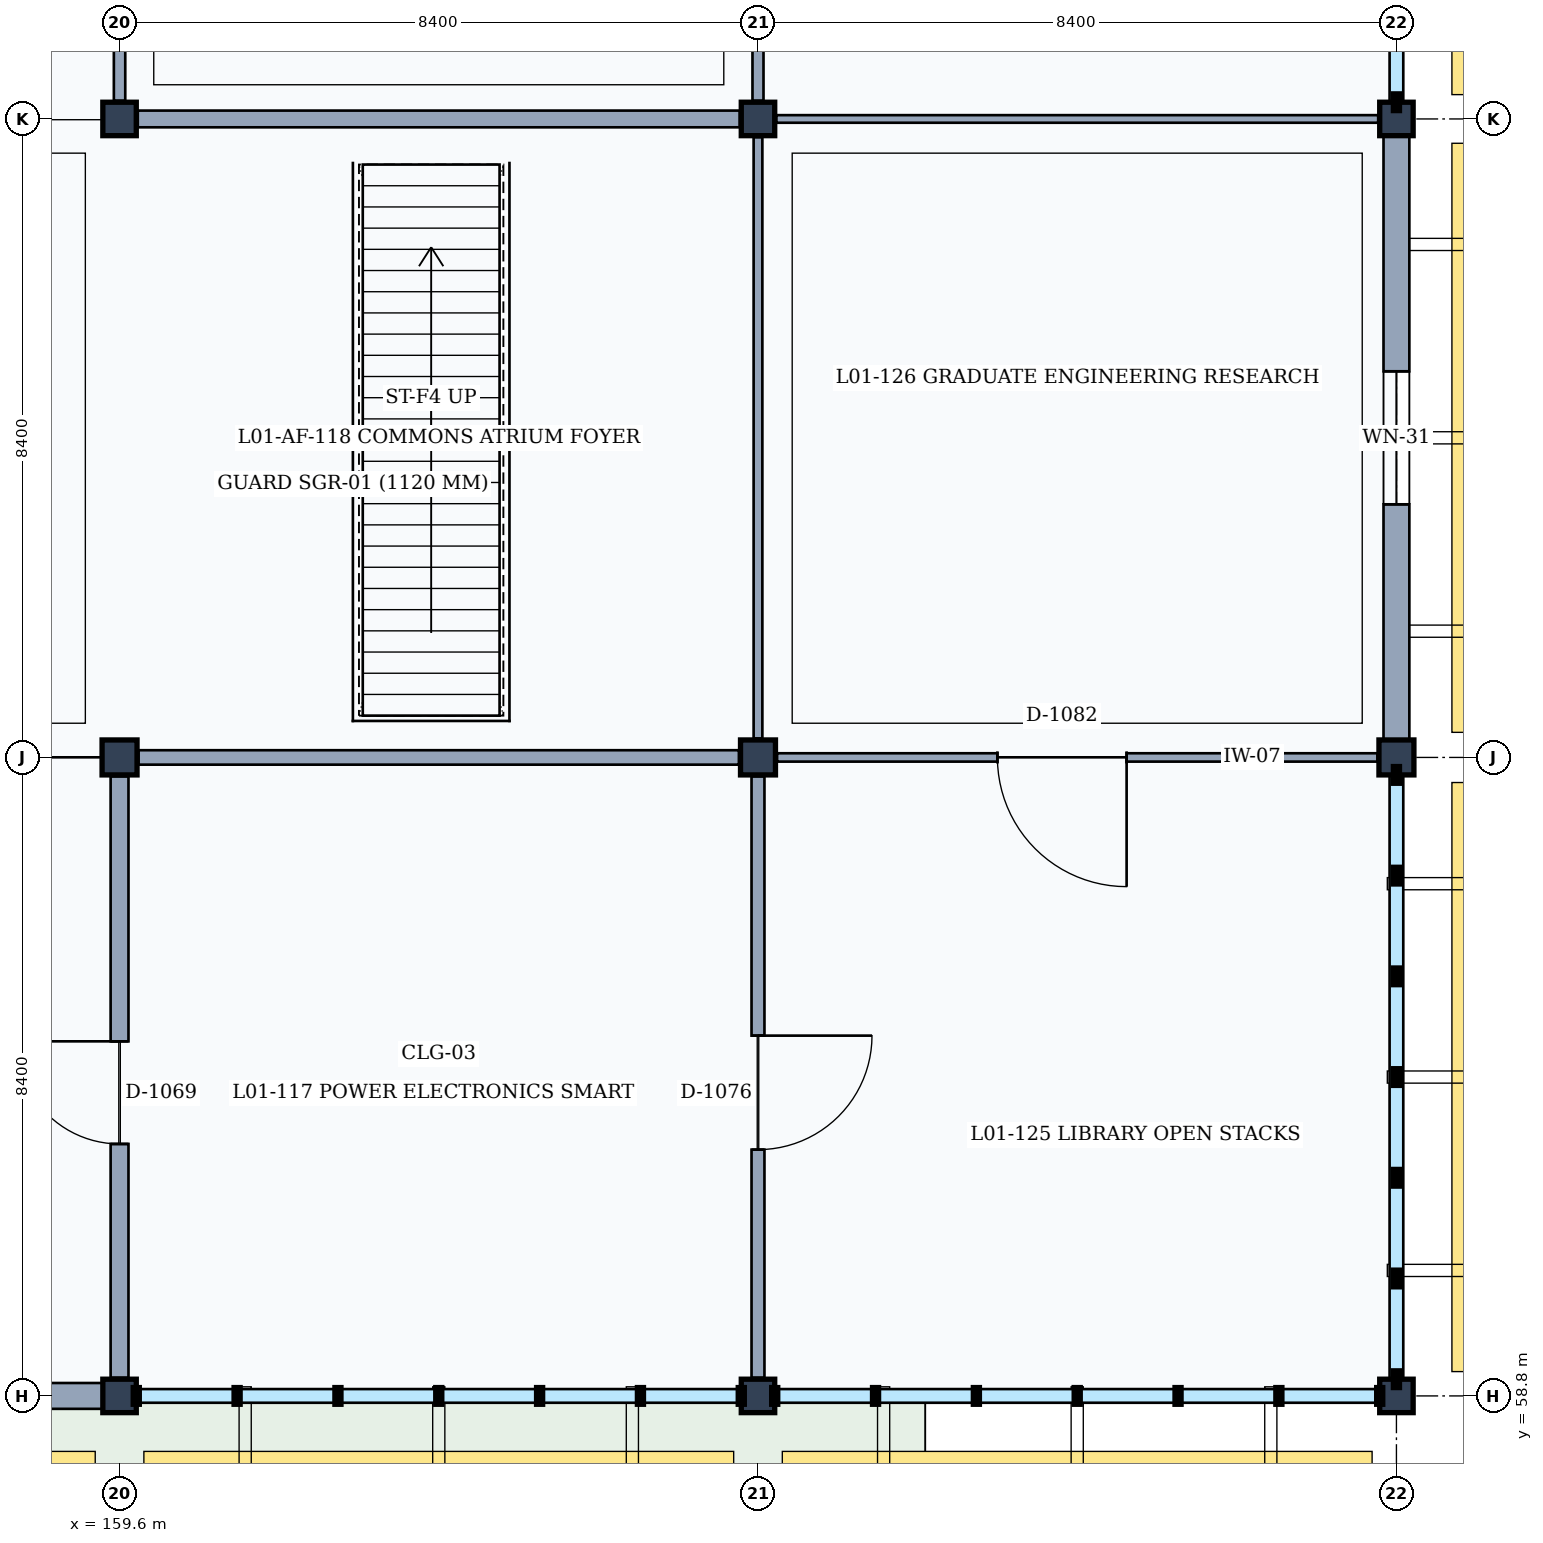
"""IFC4 building model, lengths in metres.
Left out: names, types, materials, properties, quantities, classifications, styles, units other than length and angle.
Written with IfcOpenShell. Run it as: python <this file> out.ifc"""

import sys

from ifc_helpers import new_model, si_unit, direction, frame, frame_2d, origin, origin_2d, place, context, subcontext, project, spatial, rectangle, extrude, element, fill, save


model = new_model("IFC4")
c1 = context("Model", 3, precision=1e-05, world=origin(), true_north=direction((0.0, 1.0)))
c2 = subcontext(c1, "Body", "Model", "MODEL_VIEW")
j1 = project(units=[si_unit("LENGTHUNIT", "METRE"), si_unit("PLANEANGLEUNIT", "RADIAN")], contexts=[c1])
p1 = place(None, origin())
s1 = spatial("IfcSite", under=j1, at=p1, CompositionType="ELEMENT")
p2 = place(p1, origin())
s2 = spatial("IfcBuilding", under=s1, at=p2, CompositionType="ELEMENT")
p3 = place(p2, frame((0.0, 0.0, 4.8)))
s3 = spatial("IfcBuildingStorey", under=s2, at=p3, CompositionType="ELEMENT", Elevation=4.8)
p4 = place(p3, frame((159.6, 58.8, 0.0), z_axis=(0.0, 0.0, 1.0), x_axis=(1.0, 0.0, 0.0)))
e1 = element("IfcColumn", 1, at=p4, inside=s3, PredefinedType="COLUMN", context=c2, shape_type="SweptSolid", body=[
    extrude(rectangle(XDim=0.44, YDim=0.44, at=origin_2d()), origin(), (0.0, 0.0, 1.0), 4.8),
])
p5 = place(p3, frame((159.6, 67.2, 0.0), z_axis=(0.0, 0.0, 1.0), x_axis=(1.0, 0.0, 0.0)))
e2 = element("IfcColumn", 2, at=p5, inside=s3, PredefinedType="COLUMN", context=c2, shape_type="SweptSolid", body=[
    extrude(rectangle(XDim=0.46, YDim=0.46, at=origin_2d()), origin(), (0.0, 0.0, 1.0), 4.8),
])
for number, where, z_axis, x_axis in (
    (3, (159.6, 75.6, 0.0), (0.0, 0.0, 1.0), (1.0, 0.0, 0.0)),
    (4, (168.0, 58.8, 0.0), (0.0, 0.0, 1.0), (1.0, 0.0, 0.0)),
):
    element("IfcColumn", number, at=place(p3, frame(where, z_axis=z_axis, x_axis=x_axis)), inside=s3, PredefinedType="COLUMN", context=c2, shape_type="SweptSolid", body=[
        extrude(rectangle(XDim=0.44, YDim=0.44, at=origin_2d()), origin(), (0.0, 0.0, 1.0), 4.8),
    ])
p6 = place(p3, frame((168.0, 67.2, 0.0), z_axis=(0.0, 0.0, 1.0), x_axis=(1.0, 0.0, 0.0)))
e5 = element("IfcColumn", 5, at=p6, inside=s3, PredefinedType="COLUMN", context=c2, shape_type="SweptSolid", body=[
    extrude(rectangle(XDim=0.46, YDim=0.46, at=origin_2d()), origin(), (0.0, 0.0, 1.0), 4.8),
])
for number, where, z_axis, x_axis in (
    (6, (168.0, 75.6, 0.0), (0.0, 0.0, 1.0), (1.0, 0.0, 0.0)),
    (7, (176.4, 58.8, 0.0), (0.0, 0.0, 1.0), (1.0, 0.0, 0.0)),
):
    element("IfcColumn", number, at=place(p3, frame(where, z_axis=z_axis, x_axis=x_axis)), inside=s3, PredefinedType="COLUMN", context=c2, shape_type="SweptSolid", body=[
        extrude(rectangle(XDim=0.44, YDim=0.44, at=origin_2d()), origin(), (0.0, 0.0, 1.0), 4.8),
    ])
p7 = place(p3, frame((176.4, 67.2, 0.0), z_axis=(0.0, 0.0, 1.0), x_axis=(1.0, 0.0, 0.0)))
e8 = element("IfcColumn", 8, at=p7, inside=s3, PredefinedType="COLUMN", context=c2, shape_type="SweptSolid", body=[
    extrude(rectangle(XDim=0.46, YDim=0.46, at=origin_2d()), origin(), (0.0, 0.0, 1.0), 4.8),
])
p8 = place(p3, frame((176.4, 75.6, 0.0), z_axis=(0.0, 0.0, 1.0), x_axis=(1.0, 0.0, 0.0)))
e9 = element("IfcColumn", 9, at=p8, inside=s3, PredefinedType="COLUMN", context=c2, shape_type="SweptSolid", body=[
    extrude(rectangle(XDim=0.44, YDim=0.44, at=origin_2d()), origin(), (0.0, 0.0, 1.0), 4.8),
])
p9 = place(p3, frame((159.38, 58.8, 0.0), z_axis=(0.0, 0.0, 1.0), x_axis=(-1.0, 0.0, 0.0)))
e10 = element("IfcWall", 10, at=p9, inside=s3, PredefinedType="SOLIDWALL", context=c2, shape_type="SweptSolid", body=[
    extrude(rectangle(XDim=7.96, YDim=0.34, at=frame_2d((3.98, 0.0))), origin(), (0.0, 0.0, 1.0), 3.96),
])
p10 = place(p9, frame((3.03, 0.0, 0.9)))
e11 = element("IfcOpeningElement", 11, at=p10, cuts=e10, PredefinedType="OPENING", context=c2, shape_type="SweptSolid", body=[
    extrude(rectangle(XDim=1.9, YDim=2.05, at=frame_2d((0.95, 1.025))), frame((0.0, 0.18, 0.0), z_axis=(0.0, -1.0, 0.0), x_axis=(1.0, 0.0, 0.0)), (0.0, 0.0, 1.0), 0.36),
])
p11 = place(p3, frame((176.4, 75.38, 0.0), z_axis=(0.0, 0.0, 1.0), x_axis=(0.0, -1.0, 0.0)))
e12 = element("IfcWall", 12, at=p11, inside=s3, PredefinedType="SOLIDWALL", context=c2, shape_type="SweptSolid", body=[
    extrude(rectangle(XDim=7.95, YDim=0.34, at=frame_2d((3.975, 0.0))), origin(), (0.0, 0.0, 1.0), 3.96),
])
p12 = place(p11, frame((3.1, 0.0, 0.9)))
e13 = element("IfcOpeningElement", 13, at=p12, cuts=e12, PredefinedType="OPENING", context=c2, shape_type="SweptSolid", body=[
    extrude(rectangle(XDim=1.75, YDim=1.85, at=frame_2d((0.875, 0.925))), frame((0.0, 0.18, 0.0), z_axis=(0.0, -1.0, 0.0), x_axis=(1.0, 0.0, 0.0)), (0.0, 0.0, 1.0), 0.36),
])
p13 = place(p3, frame((159.6, 59.04, 0.0), z_axis=(0.0, 0.0, 1.0), x_axis=(0.0, 1.0, 0.0)))
e14 = element("IfcWall", 14, at=p13, inside=s3, PredefinedType="PARTITIONING", context=c2, shape_type="SweptSolid", body=[
    extrude(rectangle(XDim=7.91, YDim=0.235, at=frame_2d((3.955, 0.0))), origin(), (0.0, 0.0, 1.0), 3.92),
])
p14 = place(p13, frame((3.075, 0.0, 0.0)))
e15 = element("IfcOpeningElement", 15, at=p14, cuts=e14, PredefinedType="OPENING", context=c2, shape_type="SweptSolid", body=[
    extrude(rectangle(XDim=1.35, YDim=2.25, at=frame_2d((0.675, 1.125))), frame((0.0, 0.127, 0.0), z_axis=(0.0, -1.0, 0.0), x_axis=(1.0, 0.0, 0.0)), (0.0, 0.0, 1.0), 0.255),
])
p15 = place(p3, frame((159.6, 75.84, 0.0), z_axis=(0.0, 0.0, 1.0), x_axis=(0.0, 1.0, 0.0)))
e16 = element("IfcWall", 16, at=p15, inside=s3, PredefinedType="PARTITIONING", context=c2, shape_type="SweptSolid", body=[
    extrude(rectangle(XDim=7.91, YDim=0.15, at=frame_2d((3.955, 0.0))), origin(), (0.0, 0.0, 1.0), 3.92),
])
p16 = place(p15, frame((3.025, 0.0, 0.0)))
e17 = element("IfcOpeningElement", 17, at=p16, cuts=e16, PredefinedType="OPENING", context=c2, shape_type="SweptSolid", body=[
    extrude(rectangle(XDim=1.45, YDim=2.35, at=frame_2d((0.725, 1.175))), frame((0.0, 0.085, 0.0), z_axis=(0.0, -1.0, 0.0), x_axis=(1.0, 0.0, 0.0)), (0.0, 0.0, 1.0), 0.17),
])
p17 = place(p3, frame((168.0, 59.04, 0.0), z_axis=(0.0, 0.0, 1.0), x_axis=(0.0, 1.0, 0.0)))
e18 = element("IfcWall", 18, at=p17, inside=s3, PredefinedType="PARTITIONING", context=c2, shape_type="SweptSolid", body=[
    extrude(rectangle(XDim=7.91, YDim=0.17, at=frame_2d((3.955, 0.0))), origin(), (0.0, 0.0, 1.0), 3.92),
])
p18 = place(p17, frame((3.0, 0.0, 0.0)))
e19 = element("IfcOpeningElement", 19, at=p18, cuts=e18, PredefinedType="OPENING", context=c2, shape_type="SweptSolid", body=[
    extrude(rectangle(XDim=1.5, YDim=2.3, at=frame_2d((0.75, 1.15))), frame((0.0, 0.095, 0.0), z_axis=(0.0, -1.0, 0.0), x_axis=(1.0, 0.0, 0.0)), (0.0, 0.0, 1.0), 0.19),
])
p19 = place(p3, frame((159.85, 67.2, 0.0), z_axis=(0.0, 0.0, 1.0), x_axis=(1.0, 0.0, 0.0)))
e20 = element("IfcWall", 20, at=p19, inside=s3, PredefinedType="PARTITIONING", context=c2, shape_type="SweptSolid", body=[
    extrude(rectangle(XDim=7.9, YDim=0.19, at=frame_2d((3.95, 0.0))), origin(), (0.0, 0.0, 1.0), 3.92),
])
p20 = place(p3, frame((168.0, 67.45, 0.0), z_axis=(0.0, 0.0, 1.0), x_axis=(0.0, 1.0, 0.0)))
e21 = element("IfcWall", 21, at=p20, inside=s3, PredefinedType="PARTITIONING", context=c2, shape_type="SweptSolid", body=[
    extrude(rectangle(XDim=7.91, YDim=0.115, at=frame_2d((3.955, 0.0))), origin(), (0.0, 0.0, 1.0), 3.92),
])
p21 = place(p3, frame((159.84, 75.6, 0.0), z_axis=(0.0, 0.0, 1.0), x_axis=(1.0, 0.0, 0.0)))
e22 = element("IfcWall", 22, at=p21, inside=s3, PredefinedType="PARTITIONING", context=c2, shape_type="SweptSolid", body=[
    extrude(rectangle(XDim=7.92, YDim=0.22, at=frame_2d((3.96, 0.0))), origin(), (0.0, 0.0, 1.0), 3.92),
])
p22 = place(p3, frame((168.0, 75.84, 0.0), z_axis=(0.0, 0.0, 1.0), x_axis=(0.0, 1.0, 0.0)))
e23 = element("IfcWall", 23, at=p22, inside=s3, PredefinedType="PARTITIONING", context=c2, shape_type="SweptSolid", body=[
    extrude(rectangle(XDim=7.91, YDim=0.145, at=frame_2d((3.955, 0.0))), origin(), (0.0, 0.0, 1.0), 3.92),
])
p23 = place(p22, frame((2.925, 0.0, 0.0)))
e24 = element("IfcOpeningElement", 24, at=p23, cuts=e23, PredefinedType="OPENING", context=c2, shape_type="SweptSolid", body=[
    extrude(rectangle(XDim=1.65, YDim=2.25, at=frame_2d((0.825, 1.125))), frame((0.0, 0.083, 0.0), z_axis=(0.0, -1.0, 0.0), x_axis=(1.0, 0.0, 0.0)), (0.0, 0.0, 1.0), 0.165),
])
p24 = place(p3, frame((168.25, 67.2, 0.0), z_axis=(0.0, 0.0, 1.0), x_axis=(1.0, 0.0, 0.0)))
e25 = element("IfcWall", 25, at=p24, inside=s3, PredefinedType="PARTITIONING", context=c2, shape_type="SweptSolid", body=[
    extrude(rectangle(XDim=7.9, YDim=0.11, at=frame_2d((3.95, 0.0))), origin(), (0.0, 0.0, 1.0), 3.92),
])
p25 = place(p24, frame((2.9, 0.0, 0.0)))
e26 = element("IfcOpeningElement", 26, at=p25, cuts=e25, PredefinedType="OPENING", context=c2, shape_type="SweptSolid", body=[
    extrude(rectangle(XDim=1.7, YDim=2.3, at=frame_2d((0.85, 1.15))), frame((0.0, 0.065, 0.0), z_axis=(0.0, -1.0, 0.0), x_axis=(1.0, 0.0, 0.0)), (0.0, 0.0, 1.0), 0.13),
])
p26 = place(p3, frame((168.24, 75.6, 0.0), z_axis=(0.0, 0.0, 1.0), x_axis=(1.0, 0.0, 0.0)))
e27 = element("IfcWall", 27, at=p26, inside=s3, PredefinedType="MOVABLE", context=c2, shape_type="SweptSolid", body=[
    extrude(rectangle(XDim=7.92, YDim=0.1, at=frame_2d((3.96, 0.0))), origin(), (0.0, 0.0, 1.0), 3.92),
])
p27 = place(p12, origin())
e28 = element("IfcWindow", 28, at=p27, inside=s3, PartitioningType="SINGLE_PANEL", PredefinedType="WINDOW", context=c2, shape_type="SweptSolid", body=[
    extrude(rectangle(XDim=1.75, YDim=1.85, at=frame_2d((0.875, 0.925))), frame((0.0, 0.03, 0.0), z_axis=(0.0, -1.0, 0.0), x_axis=(1.0, 0.0, 0.0)), (0.0, 0.0, 1.0), 0.06),
])
fill(e13, e28)
p28 = place(p14, origin())
e29 = element("IfcDoor", 29, at=p28, inside=s3, OperationType="SINGLE_SWING_RIGHT", PredefinedType="DOOR", context=c2, shape_type="SweptSolid", body=[
    extrude(rectangle(XDim=1.35, YDim=2.25, at=frame_2d((0.675, 1.125))), frame((0.0, 0.025, 0.0), z_axis=(0.0, -1.0, 0.0), x_axis=(1.0, 0.0, 0.0)), (0.0, 0.0, 1.0), 0.05),
])
fill(e15, e29)
p29 = place(p18, frame((1.5, 0.0, 0.0), z_axis=(0.0, 0.0, 1.0), x_axis=(-1.0, 0.0, 0.0)))
e30 = element("IfcDoor", 30, at=p29, inside=s3, OperationType="SINGLE_SWING_LEFT", PredefinedType="DOOR", context=c2, shape_type="SweptSolid", body=[
    extrude(rectangle(XDim=1.5, YDim=2.3, at=frame_2d((0.75, 1.15))), frame((0.0, 0.025, 0.0), z_axis=(0.0, -1.0, 0.0), x_axis=(1.0, 0.0, 0.0)), (0.0, 0.0, 1.0), 0.05),
])
fill(e19, e30)
p30 = place(p25, frame((1.7, 0.0, 0.0), z_axis=(0.0, 0.0, 1.0), x_axis=(-1.0, 0.0, 0.0)))
e31 = element("IfcDoor", 31, at=p30, inside=s3, OperationType="SINGLE_SWING_LEFT", PredefinedType="DOOR", context=c2, shape_type="SweptSolid", body=[
    extrude(rectangle(XDim=1.7, YDim=2.3, at=frame_2d((0.85, 1.15))), frame((0.0, 0.025, 0.0), z_axis=(0.0, -1.0, 0.0), x_axis=(1.0, 0.0, 0.0)), (0.0, 0.0, 1.0), 0.05),
])
fill(e26, e31)
save(model, sys.argv[1])
